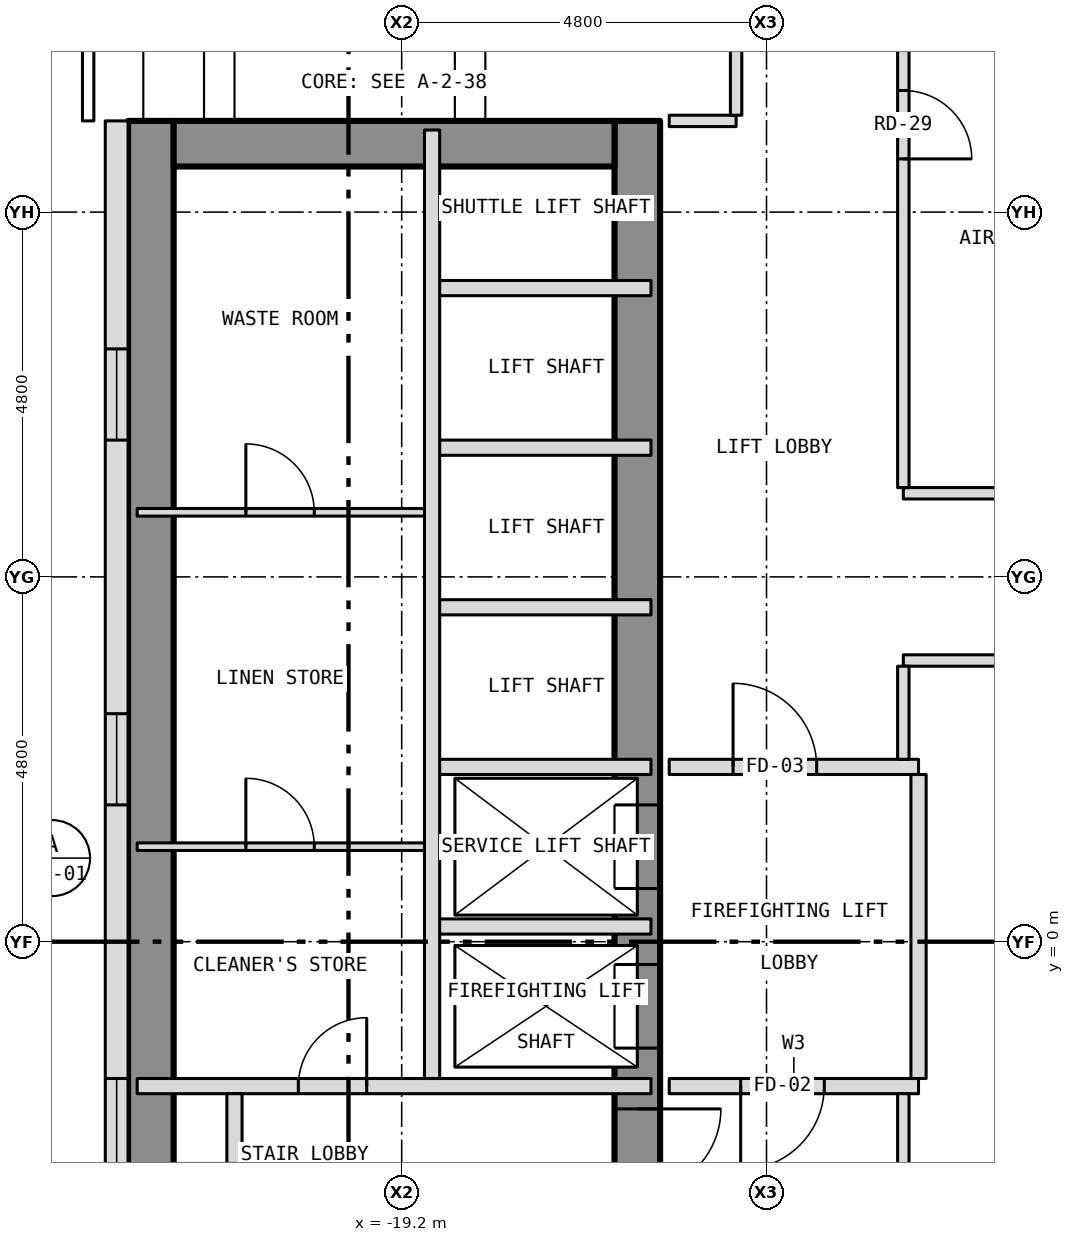
"""IFC4 building model, lengths in metres.
Left out: names, types, materials, properties, quantities, classifications, styles, units other than length and angle.
Written with IfcOpenShell. Run it as: python <this file> out.ifc"""

import sys

from ifc_helpers import new_model, si_unit, direction, frame, frame_2d, origin, place, context, subcontext, project, spatial, rectangle, extrude, element, fill, save


model = new_model("IFC4")
c1 = context("Model", 3, precision=1e-05, world=origin(), true_north=direction((0.0, 1.0)))
c2 = subcontext(c1, "Body", "Model", "MODEL_VIEW")
j1 = project(units=[si_unit("LENGTHUNIT", "METRE"), si_unit("PLANEANGLEUNIT", "RADIAN")], contexts=[c1])
p1 = place(None, origin())
s1 = spatial("IfcSite", under=j1, at=p1, CompositionType="ELEMENT")
p2 = place(p1, origin())
s2 = spatial("IfcBuilding", under=s1, at=p2, CompositionType="ELEMENT")
p3 = place(p2, frame((0.0, 0.0, 138.0)))
s3 = spatial("IfcBuildingStorey", under=s2, at=p3, CompositionType="ELEMENT", Elevation=138.0)
p4 = place(p3, frame((-16.1, -10.8, 0.0), z_axis=(0.0, 0.0, 1.0), x_axis=(0.0, 1.0, 0.0)))
e1 = element("IfcWall", 1, at=p4, inside=s3, PredefinedType="SHEAR", context=c2, shape_type="SweptSolid", body=[
    extrude(rectangle(XDim=21.6, YDim=0.6, at=frame_2d((10.8, 0.0))), origin(), (0.0, 0.0, 1.0), 3.9),
])
p5 = place(p4, frame((9.4, 0.0, 0.0)))
e2 = element("IfcOpeningElement", 2, at=p5, cuts=e1, PredefinedType="OPENING", context=c2, shape_type="SweptSolid", body=[
    extrude(rectangle(XDim=1.1, YDim=2.1, at=frame_2d((0.55, 1.05))), frame((0.0, 0.312, 0.0), z_axis=(0.0, -1.0, 0.0), x_axis=(1.0, 0.0, 0.0)), (0.0, 0.0, 1.0), 0.624),
])
p6 = place(p4, frame((11.5, 0.0, 0.0)))
e3 = element("IfcOpeningElement", 3, at=p6, cuts=e1, PredefinedType="OPENING", context=c2, shape_type="SweptSolid", body=[
    extrude(rectangle(XDim=1.1, YDim=2.1, at=frame_2d((0.55, 1.05))), frame((0.0, 0.312, 0.0), z_axis=(0.0, -1.0, 0.0), x_axis=(1.0, 0.0, 0.0)), (0.0, 0.0, 1.0), 0.624),
])
p7 = place(p4, frame((0.758, 0.0, 0.0)))
e4 = element("IfcOpeningElement", 4, at=p7, cuts=e1, PredefinedType="OPENING", context=c2, shape_type="SweptSolid", body=[
    extrude(rectangle(XDim=1.1, YDim=2.1, at=frame_2d((0.55, 1.05))), frame((0.0, 0.312, 0.0), z_axis=(0.0, -1.0, 0.0), x_axis=(1.0, 0.0, 0.0)), (0.0, 0.0, 1.0), 0.624),
])
p8 = place(p4, frame((7.5, 0.0, 0.0)))
e5 = element("IfcOpeningElement", 5, at=p8, cuts=e1, PredefinedType="OPENING", context=c2, shape_type="SweptSolid", body=[
    extrude(rectangle(XDim=1.1, YDim=2.1, at=frame_2d((0.55, 1.05))), frame((0.0, 0.312, 0.0), z_axis=(0.0, -1.0, 0.0), x_axis=(1.0, 0.0, 0.0)), (0.0, 0.0, 1.0), 0.624),
])
p9 = place(p3, frame((-22.5, -10.8, 0.0), z_axis=(0.0, 0.0, 1.0), x_axis=(0.0, 1.0, 0.0)))
e6 = element("IfcWall", 6, at=p9, inside=s3, PredefinedType="SHEAR", context=c2, shape_type="SweptSolid", body=[
    extrude(rectangle(XDim=21.6, YDim=0.6, at=frame_2d((10.8, 0.0))), origin(), (0.0, 0.0, 1.0), 3.9),
])
p10 = place(p3, frame((-22.2, 10.5, 0.0), z_axis=(0.0, 0.0, 1.0), x_axis=(1.0, 0.0, 0.0)))
e7 = element("IfcWall", 7, at=p10, inside=s3, PredefinedType="SHEAR", context=c2, shape_type="SweptSolid", body=[
    extrude(rectangle(XDim=5.8, YDim=0.6, at=frame_2d((2.9, 0.0))), origin(), (0.0, 0.0, 1.0), 3.9),
])
p11 = place(p3, frame((-22.95, 10.8, 0.0), z_axis=(0.0, 0.0, 1.0), x_axis=(0.0, -1.0, 0.0)))
e8 = element("IfcWall", 8, at=p11, inside=s3, PredefinedType="SOLIDWALL", context=c2, shape_type="SweptSolid", body=[
    extrude(rectangle(XDim=21.6, YDim=0.3, at=frame_2d((10.8, 0.0))), origin(), (0.0, 0.0, 1.0), 4.5),
])
p12 = place(p11, frame((3.0, 0.0, 2.2)))
e9 = element("IfcOpeningElement", 9, at=p12, cuts=e8, PredefinedType="OPENING", context=c2, shape_type="SweptSolid", body=[
    extrude(rectangle(XDim=1.2, YDim=0.6, at=frame_2d((0.6, 0.3))), frame((0.0, 0.162, 0.0), z_axis=(0.0, -1.0, 0.0), x_axis=(1.0, 0.0, 0.0)), (0.0, 0.0, 1.0), 0.324),
])
p13 = place(p11, frame((7.8, 0.0, 2.2)))
e10 = element("IfcOpeningElement", 10, at=p13, cuts=e8, PredefinedType="OPENING", context=c2, shape_type="SweptSolid", body=[
    extrude(rectangle(XDim=1.2, YDim=0.6, at=frame_2d((0.6, 0.3))), frame((0.0, 0.162, 0.0), z_axis=(0.0, -1.0, 0.0), x_axis=(1.0, 0.0, 0.0)), (0.0, 0.0, 1.0), 0.324),
])
p14 = place(p11, frame((12.6, 0.0, 2.2)))
e11 = element("IfcOpeningElement", 11, at=p14, cuts=e8, PredefinedType="OPENING", context=c2, shape_type="SweptSolid", body=[
    extrude(rectangle(XDim=1.2, YDim=0.6, at=frame_2d((0.6, 0.3))), frame((0.0, 0.162, 0.0), z_axis=(0.0, -1.0, 0.0), x_axis=(1.0, 0.0, 0.0)), (0.0, 0.0, 1.0), 0.324),
])
p15 = place(p11, frame((17.4, 0.0, 2.2)))
e12 = element("IfcOpeningElement", 12, at=p15, cuts=e8, PredefinedType="OPENING", context=c2, shape_type="SweptSolid", body=[
    extrude(rectangle(XDim=1.2, YDim=0.6, at=frame_2d((0.6, 0.3))), frame((0.0, 0.162, 0.0), z_axis=(0.0, -1.0, 0.0), x_axis=(1.0, 0.0, 0.0)), (0.0, 0.0, 1.0), 0.324),
])
p16 = place(p3, frame((-22.68, -1.9, 0.0), z_axis=(0.0, 0.0, 1.0), x_axis=(1.0, 0.0, 0.0)))
e13 = element("IfcWall", 13, at=p16, inside=s3, PredefinedType="PARTITIONING", context=c2, shape_type="SweptSolid", body=[
    extrude(rectangle(XDim=6.76, YDim=0.2, at=frame_2d((3.38, 0.0))), origin(), (0.0, 0.0, 1.0), 3.9),
])
p17 = place(p16, frame((2.12, 0.0, 0.0)))
e14 = element("IfcOpeningElement", 14, at=p17, cuts=e13, PredefinedType="OPENING", context=c2, shape_type="SweptSolid", body=[
    extrude(rectangle(XDim=0.9, YDim=2.1, at=frame_2d((0.45, 1.05))), frame((0.0, 0.112, 0.0), z_axis=(0.0, -1.0, 0.0), x_axis=(1.0, 0.0, 0.0)), (0.0, 0.0, 1.0), 0.224),
])
p18 = place(p3, frame((-15.68, -1.9, 0.0), z_axis=(0.0, 0.0, 1.0), x_axis=(1.0, 0.0, 0.0)))
e15 = element("IfcWall", 15, at=p18, inside=s3, PredefinedType="PARTITIONING", context=c2, shape_type="SweptSolid", body=[
    extrude(rectangle(XDim=3.28, YDim=0.2, at=frame_2d((1.64, 0.0))), origin(), (0.0, 0.0, 1.0), 4.3),
])
p19 = place(p18, frame((0.94, 0.0, 0.0)))
e16 = element("IfcOpeningElement", 16, at=p19, cuts=e15, PredefinedType="OPENING", context=c2, shape_type="SweptSolid", body=[
    extrude(rectangle(XDim=1.1, YDim=2.1, at=frame_2d((0.55, 1.05))), frame((0.0, 0.112, 0.0), z_axis=(0.0, -1.0, 0.0), x_axis=(1.0, 0.0, 0.0)), (0.0, 0.0, 1.0), 0.224),
])
p20 = place(p3, frame((-18.8, 0.2, 0.0), z_axis=(0.0, 0.0, 1.0), x_axis=(1.0, 0.0, 0.0)))
e17 = element("IfcWall", 17, at=p20, inside=s3, PredefinedType="PARTITIONING", context=c2, shape_type="SweptSolid", body=[
    extrude(rectangle(XDim=2.88, YDim=0.2, at=frame_2d((1.44, 0.0))), origin(), (0.0, 0.0, 1.0), 3.9),
])
p21 = place(p3, frame((-22.68, 1.25, 0.0), z_axis=(0.0, 0.0, 1.0), x_axis=(1.0, 0.0, 0.0)))
e18 = element("IfcWall", 18, at=p21, inside=s3, PredefinedType="PARTITIONING", context=c2, shape_type="SweptSolid", body=[
    extrude(rectangle(XDim=3.88, YDim=0.1, at=frame_2d((1.94, 0.0))), origin(), (0.0, 0.0, 1.0), 3.9),
])
p22 = place(p21, frame((1.43, 0.0, 0.0)))
e19 = element("IfcOpeningElement", 19, at=p22, cuts=e18, PredefinedType="OPENING", context=c2, shape_type="SweptSolid", body=[
    extrude(rectangle(XDim=0.9, YDim=2.1, at=frame_2d((0.45, 1.05))), frame((0.0, 0.062, 0.0), z_axis=(0.0, -1.0, 0.0), x_axis=(1.0, 0.0, 0.0)), (0.0, 0.0, 1.0), 0.124),
])
p23 = place(p3, frame((-18.8, 2.3, 0.0), z_axis=(0.0, 0.0, 1.0), x_axis=(1.0, 0.0, 0.0)))
e20 = element("IfcWall", 20, at=p23, inside=s3, PredefinedType="PARTITIONING", context=c2, shape_type="SweptSolid", body=[
    extrude(rectangle(XDim=2.88, YDim=0.2, at=frame_2d((1.44, 0.0))), origin(), (0.0, 0.0, 1.0), 3.9),
])
p24 = place(p3, frame((-15.68, 2.3, 0.0), z_axis=(0.0, 0.0, 1.0), x_axis=(1.0, 0.0, 0.0)))
e21 = element("IfcWall", 21, at=p24, inside=s3, PredefinedType="PARTITIONING", context=c2, shape_type="SweptSolid", body=[
    extrude(rectangle(XDim=3.28, YDim=0.2, at=frame_2d((1.64, 0.0))), origin(), (0.0, 0.0, 1.0), 4.3),
])
p25 = place(p24, frame((0.84, 0.0, 0.0)))
e22 = element("IfcOpeningElement", 22, at=p25, cuts=e21, PredefinedType="OPENING", context=c2, shape_type="SweptSolid", body=[
    extrude(rectangle(XDim=1.1, YDim=2.1, at=frame_2d((0.55, 1.05))), frame((0.0, 0.112, 0.0), z_axis=(0.0, -1.0, 0.0), x_axis=(1.0, 0.0, 0.0)), (0.0, 0.0, 1.0), 0.224),
])
p26 = place(p3, frame((-12.6, 3.7, 0.0), z_axis=(0.0, 0.0, 1.0), x_axis=(1.0, 0.0, 0.0)))
e23 = element("IfcWall", 23, at=p26, inside=s3, PredefinedType="PARTITIONING", context=c2, shape_type="SweptSolid", body=[
    extrude(rectangle(XDim=16.3, YDim=0.15, at=frame_2d((8.15, 0.0))), origin(), (0.0, 0.0, 1.0), 4.3),
])
p27 = place(p26, frame((3.625, 0.0, 0.0)))
e24 = element("IfcOpeningElement", 24, at=p27, cuts=e23, PredefinedType="OPENING", context=c2, shape_type="SweptSolid", body=[
    extrude(rectangle(XDim=0.9, YDim=2.1, at=frame_2d((0.45, 1.05))), frame((0.0, 0.087, 0.0), z_axis=(0.0, -1.0, 0.0), x_axis=(1.0, 0.0, 0.0)), (0.0, 0.0, 1.0), 0.174),
])
p28 = place(p26, frame((11.775, 0.0, 0.0)))
e25 = element("IfcOpeningElement", 25, at=p28, cuts=e23, PredefinedType="OPENING", context=c2, shape_type="SweptSolid", body=[
    extrude(rectangle(XDim=0.9, YDim=2.1, at=frame_2d((0.45, 1.05))), frame((0.0, 0.087, 0.0), z_axis=(0.0, -1.0, 0.0), x_axis=(1.0, 0.0, 0.0)), (0.0, 0.0, 1.0), 0.174),
])
p29 = place(p3, frame((-18.8, 4.4, 0.0), z_axis=(0.0, 0.0, 1.0), x_axis=(1.0, 0.0, 0.0)))
e26 = element("IfcWall", 26, at=p29, inside=s3, PredefinedType="PARTITIONING", context=c2, shape_type="SweptSolid", body=[
    extrude(rectangle(XDim=2.88, YDim=0.2, at=frame_2d((1.44, 0.0))), origin(), (0.0, 0.0, 1.0), 3.9),
])
p30 = place(p3, frame((-22.68, 5.65, 0.0), z_axis=(0.0, 0.0, 1.0), x_axis=(1.0, 0.0, 0.0)))
e27 = element("IfcWall", 27, at=p30, inside=s3, PredefinedType="PARTITIONING", context=c2, shape_type="SweptSolid", body=[
    extrude(rectangle(XDim=3.88, YDim=0.1, at=frame_2d((1.94, 0.0))), origin(), (0.0, 0.0, 1.0), 3.9),
])
p31 = place(p30, frame((1.43, 0.0, 0.0)))
e28 = element("IfcOpeningElement", 28, at=p31, cuts=e27, PredefinedType="OPENING", context=c2, shape_type="SweptSolid", body=[
    extrude(rectangle(XDim=0.9, YDim=2.1, at=frame_2d((0.45, 1.05))), frame((0.0, 0.062, 0.0), z_axis=(0.0, -1.0, 0.0), x_axis=(1.0, 0.0, 0.0)), (0.0, 0.0, 1.0), 0.124),
])
p32 = place(p3, frame((-12.6, 5.9, 0.0), z_axis=(0.0, 0.0, 1.0), x_axis=(1.0, 0.0, 0.0)))
e29 = element("IfcWall", 29, at=p32, inside=s3, PredefinedType="PARTITIONING", context=c2, shape_type="SweptSolid", body=[
    extrude(rectangle(XDim=16.3, YDim=0.15, at=frame_2d((8.15, 0.0))), origin(), (0.0, 0.0, 1.0), 4.3),
])
p33 = place(p32, frame((5.662, 0.0, 0.0)))
e30 = element("IfcOpeningElement", 30, at=p33, cuts=e29, PredefinedType="OPENING", context=c2, shape_type="SweptSolid", body=[
    extrude(rectangle(XDim=0.9, YDim=2.1, at=frame_2d((0.45, 1.05))), frame((0.0, 0.087, 0.0), z_axis=(0.0, -1.0, 0.0), x_axis=(1.0, 0.0, 0.0)), (0.0, 0.0, 1.0), 0.174),
])
for number, where, z_axis, x_axis in (
    (31, (-18.8, 6.5, 0.0), (0.0, 0.0, 1.0), (1.0, 0.0, 0.0)),
    (32, (-18.8, 8.6, 0.0), (0.0, 0.0, 1.0), (1.0, 0.0, 0.0)),
):
    element("IfcWall", number, at=place(p3, frame(where, z_axis=z_axis, x_axis=x_axis)), inside=s3, PredefinedType="PARTITIONING", context=c2, shape_type="SweptSolid", body=[
        extrude(rectangle(XDim=2.88, YDim=0.2, at=frame_2d((1.44, 0.0))), origin(), (0.0, 0.0, 1.0), 3.9),
    ])
p34 = place(p3, frame((-15.68, 10.8, 0.0), z_axis=(0.0, 0.0, 1.0), x_axis=(1.0, 0.0, 0.0)))
e33 = element("IfcWall", 33, at=p34, inside=s3, PredefinedType="PARTITIONING", context=c2, shape_type="SweptSolid", body=[
    extrude(rectangle(XDim=0.88, YDim=0.15, at=frame_2d((0.44, 0.0))), origin(), (0.0, 0.0, 1.0), 4.3),
])
p35 = place(p3, frame((-21.4, -10.68, 0.0), z_axis=(0.0, 0.0, 1.0), x_axis=(0.0, 1.0, 0.0)))
e34 = element("IfcWall", 34, at=p35, inside=s3, PredefinedType="PARTITIONING", context=c2, shape_type="SweptSolid", body=[
    extrude(rectangle(XDim=8.68, YDim=0.2, at=frame_2d((4.34, 0.0))), origin(), (0.0, 0.0, 1.0), 3.9),
])
p36 = place(p35, frame((0.899, 0.0, 0.0)))
e35 = element("IfcOpeningElement", 35, at=p36, cuts=e34, PredefinedType="OPENING", context=c2, shape_type="SweptSolid", body=[
    extrude(rectangle(XDim=0.9, YDim=2.1, at=frame_2d((0.45, 1.05))), frame((0.0, 0.112, 0.0), z_axis=(0.0, -1.0, 0.0), x_axis=(1.0, 0.0, 0.0)), (0.0, 0.0, 1.0), 0.224),
])
p37 = place(p35, frame((3.88, 0.0, 0.0)))
e36 = element("IfcOpeningElement", 36, at=p37, cuts=e34, PredefinedType="OPENING", context=c2, shape_type="SweptSolid", body=[
    extrude(rectangle(XDim=0.9, YDim=2.1, at=frame_2d((0.45, 1.05))), frame((0.0, 0.112, 0.0), z_axis=(0.0, -1.0, 0.0), x_axis=(1.0, 0.0, 0.0)), (0.0, 0.0, 1.0), 0.224),
])
p38 = place(p35, frame((6.862, 0.0, 0.0)))
e37 = element("IfcOpeningElement", 37, at=p38, cuts=e34, PredefinedType="OPENING", context=c2, shape_type="SweptSolid", body=[
    extrude(rectangle(XDim=0.9, YDim=2.1, at=frame_2d((0.45, 1.05))), frame((0.0, 0.112, 0.0), z_axis=(0.0, -1.0, 0.0), x_axis=(1.0, 0.0, 0.0)), (0.0, 0.0, 1.0), 0.224),
])
p39 = place(p3, frame((-18.8, -1.8, 0.0), z_axis=(0.0, 0.0, 1.0), x_axis=(0.0, 1.0, 0.0)))
e38 = element("IfcWall", 38, at=p39, inside=s3, PredefinedType="PARTITIONING", context=c2, shape_type="SweptSolid", body=[
    extrude(rectangle(XDim=12.48, YDim=0.2, at=frame_2d((6.24, 0.0))), origin(), (0.0, 0.0, 1.0), 3.9),
])
p40 = place(p3, frame((-14.8, 10.875, 0.0), z_axis=(0.0, 0.0, 1.0), x_axis=(0.0, 1.0, 0.0)))
e39 = element("IfcWall", 39, at=p40, inside=s3, PredefinedType="PARTITIONING", context=c2, shape_type="SweptSolid", body=[
    extrude(rectangle(XDim=3.85, YDim=0.15, at=frame_2d((1.925, 0.0))), origin(), (0.0, 0.0, 1.0), 4.3),
])
p41 = place(p40, frame((1.025, 0.0, 0.0)))
e40 = element("IfcOpeningElement", 40, at=p41, cuts=e39, PredefinedType="OPENING", context=c2, shape_type="SweptSolid", body=[
    extrude(rectangle(XDim=1.8, YDim=2.1, at=frame_2d((0.9, 1.05))), frame((0.0, 0.087, 0.0), z_axis=(0.0, -1.0, 0.0), x_axis=(1.0, 0.0, 0.0)), (0.0, 0.0, 1.0), 0.174),
])
p42 = place(p3, frame((-12.6, -12.525, 0.0), z_axis=(0.0, 0.0, 1.0), x_axis=(0.0, 1.0, 0.0)))
e41 = element("IfcWall", 41, at=p42, inside=s3, PredefinedType="PARTITIONING", context=c2, shape_type="SweptSolid", body=[
    extrude(rectangle(XDim=10.525, YDim=0.15, at=frame_2d((5.262, 0.0))), origin(), (0.0, 0.0, 1.0), 4.3),
])
p43 = place(p3, frame((-12.6, 2.4, 0.0), z_axis=(0.0, 0.0, 1.0), x_axis=(0.0, 1.0, 0.0)))
e42 = element("IfcWall", 42, at=p43, inside=s3, PredefinedType="PARTITIONING", context=c2, shape_type="SweptSolid", body=[
    extrude(rectangle(XDim=1.225, YDim=0.15, at=frame_2d((0.613, 0.0))), origin(), (0.0, 0.0, 1.0), 4.3),
])
p44 = place(p3, frame((-12.6, 5.975, 0.0), z_axis=(0.0, 0.0, 1.0), x_axis=(0.0, 1.0, 0.0)))
e43 = element("IfcWall", 43, at=p44, inside=s3, PredefinedType="PARTITIONING", context=c2, shape_type="SweptSolid", body=[
    extrude(rectangle(XDim=6.55, YDim=0.15, at=frame_2d((3.275, 0.0))), origin(), (0.0, 0.0, 1.0), 4.3),
])
p45 = place(p44, frame((4.325, 0.0, 0.0)))
e44 = element("IfcOpeningElement", 44, at=p45, cuts=e43, PredefinedType="OPENING", context=c2, shape_type="SweptSolid", body=[
    extrude(rectangle(XDim=0.9, YDim=2.1, at=frame_2d((0.45, 1.05))), frame((0.0, 0.087, 0.0), z_axis=(0.0, -1.0, 0.0), x_axis=(1.0, 0.0, 0.0)), (0.0, 0.0, 1.0), 0.174),
])
p46 = place(p3, frame((-12.4, -1.8, 0.0), z_axis=(0.0, 0.0, 1.0), x_axis=(0.0, 1.0, 0.0)))
e45 = element("IfcWall", 45, at=p46, inside=s3, PredefinedType="PARTITIONING", context=c2, shape_type="SweptSolid", body=[
    extrude(rectangle(XDim=4.0, YDim=0.2, at=frame_2d((2.0, 0.0))), origin(), (0.0, 0.0, 1.0), 4.3),
])
p47 = place(p12, origin())
e46 = element("IfcWindow", 46, at=p47, inside=s3, PartitioningType="SINGLE_PANEL", PredefinedType="WINDOW", context=c2, shape_type="SweptSolid", body=[
    extrude(rectangle(XDim=1.2, YDim=0.6, at=frame_2d((0.6, 0.3))), frame((0.0, -0.06, 0.0), z_axis=(0.0, -1.0, 0.0), x_axis=(1.0, 0.0, 0.0)), (0.0, 0.0, 1.0), 0.06),
])
fill(e9, e46)
p48 = place(p13, origin())
e47 = element("IfcWindow", 47, at=p48, inside=s3, PartitioningType="SINGLE_PANEL", PredefinedType="WINDOW", context=c2, shape_type="SweptSolid", body=[
    extrude(rectangle(XDim=1.2, YDim=0.6, at=frame_2d((0.6, 0.3))), frame((0.0, -0.06, 0.0), z_axis=(0.0, -1.0, 0.0), x_axis=(1.0, 0.0, 0.0)), (0.0, 0.0, 1.0), 0.06),
])
fill(e10, e47)
p49 = place(p14, origin())
e48 = element("IfcWindow", 48, at=p49, inside=s3, PartitioningType="SINGLE_PANEL", PredefinedType="WINDOW", context=c2, shape_type="SweptSolid", body=[
    extrude(rectangle(XDim=1.2, YDim=0.6, at=frame_2d((0.6, 0.3))), frame((0.0, -0.06, 0.0), z_axis=(0.0, -1.0, 0.0), x_axis=(1.0, 0.0, 0.0)), (0.0, 0.0, 1.0), 0.06),
])
fill(e11, e48)
p50 = place(p5, origin())
e49 = element("IfcDoor", 49, at=p50, inside=s3, OperationType="SLIDING_TO_LEFT", PredefinedType="DOOR", context=c2, shape_type="SweptSolid", body=[
    extrude(rectangle(XDim=1.1, YDim=2.1, at=frame_2d((0.55, 1.05))), frame((0.0, 0.025, 0.0), z_axis=(0.0, -1.0, 0.0), x_axis=(1.0, 0.0, 0.0)), (0.0, 0.0, 1.0), 0.05),
])
fill(e2, e49)
p51 = place(p6, origin())
e50 = element("IfcDoor", 50, at=p51, inside=s3, OperationType="SLIDING_TO_LEFT", PredefinedType="DOOR", context=c2, shape_type="SweptSolid", body=[
    extrude(rectangle(XDim=1.1, YDim=2.1, at=frame_2d((0.55, 1.05))), frame((0.0, 0.025, 0.0), z_axis=(0.0, -1.0, 0.0), x_axis=(1.0, 0.0, 0.0)), (0.0, 0.0, 1.0), 0.05),
])
fill(e3, e50)
p52 = place(p8, origin())
e51 = element("IfcDoor", 51, at=p52, inside=s3, OperationType="SINGLE_SWING_RIGHT", PredefinedType="DOOR", context=c2, shape_type="SweptSolid", body=[
    extrude(rectangle(XDim=1.1, YDim=2.1, at=frame_2d((0.55, 1.05))), frame((0.0, 0.025, 0.0), z_axis=(0.0, -1.0, 0.0), x_axis=(1.0, 0.0, 0.0)), (0.0, 0.0, 1.0), 0.05),
])
fill(e5, e51)
p53 = place(p17, origin())
e52 = element("IfcDoor", 52, at=p53, inside=s3, OperationType="SINGLE_SWING_RIGHT", PredefinedType="DOOR", context=c2, shape_type="SweptSolid", body=[
    extrude(rectangle(XDim=0.9, YDim=2.1, at=frame_2d((0.45, 1.05))), frame((0.0, 0.025, 0.0), z_axis=(0.0, -1.0, 0.0), x_axis=(1.0, 0.0, 0.0)), (0.0, 0.0, 1.0), 0.05),
])
fill(e14, e52)
p54 = place(p22, origin())
e53 = element("IfcDoor", 53, at=p54, inside=s3, OperationType="SINGLE_SWING_LEFT", PredefinedType="DOOR", context=c2, shape_type="SweptSolid", body=[
    extrude(rectangle(XDim=0.9, YDim=2.1, at=frame_2d((0.45, 1.05))), frame((0.0, 0.025, 0.0), z_axis=(0.0, -1.0, 0.0), x_axis=(1.0, 0.0, 0.0)), (0.0, 0.0, 1.0), 0.05),
])
fill(e19, e53)
p55 = place(p31, origin())
e54 = element("IfcDoor", 54, at=p55, inside=s3, OperationType="SINGLE_SWING_LEFT", PredefinedType="DOOR", context=c2, shape_type="SweptSolid", body=[
    extrude(rectangle(XDim=0.9, YDim=2.1, at=frame_2d((0.45, 1.05))), frame((0.0, 0.025, 0.0), z_axis=(0.0, -1.0, 0.0), x_axis=(1.0, 0.0, 0.0)), (0.0, 0.0, 1.0), 0.05),
])
fill(e28, e54)
p56 = place(p19, origin())
e55 = element("IfcDoor", 55, at=p56, inside=s3, OperationType="SINGLE_SWING_LEFT", PredefinedType="DOOR", context=c2, shape_type="SweptSolid", body=[
    extrude(rectangle(XDim=1.1, YDim=2.1, at=frame_2d((0.55, 1.05))), frame((0.0, 0.025, 0.0), z_axis=(0.0, -1.0, 0.0), x_axis=(1.0, 0.0, 0.0)), (0.0, 0.0, 1.0), 0.05),
])
fill(e16, e55)
p57 = place(p25, origin())
e56 = element("IfcDoor", 56, at=p57, inside=s3, OperationType="SINGLE_SWING_LEFT", PredefinedType="DOOR", context=c2, shape_type="SweptSolid", body=[
    extrude(rectangle(XDim=1.1, YDim=2.1, at=frame_2d((0.55, 1.05))), frame((0.0, 0.025, 0.0), z_axis=(0.0, -1.0, 0.0), x_axis=(1.0, 0.0, 0.0)), (0.0, 0.0, 1.0), 0.05),
])
fill(e22, e56)
p58 = place(p45, origin())
e57 = element("IfcDoor", 57, at=p58, inside=s3, OperationType="SINGLE_SWING_LEFT", PredefinedType="DOOR", context=c2, shape_type="SweptSolid", body=[
    extrude(rectangle(XDim=0.9, YDim=2.1, at=frame_2d((0.45, 1.05))), frame((0.0, 0.025, 0.0), z_axis=(0.0, -1.0, 0.0), x_axis=(1.0, 0.0, 0.0)), (0.0, 0.0, 1.0), 0.05),
])
fill(e44, e57)
save(model, sys.argv[1])
